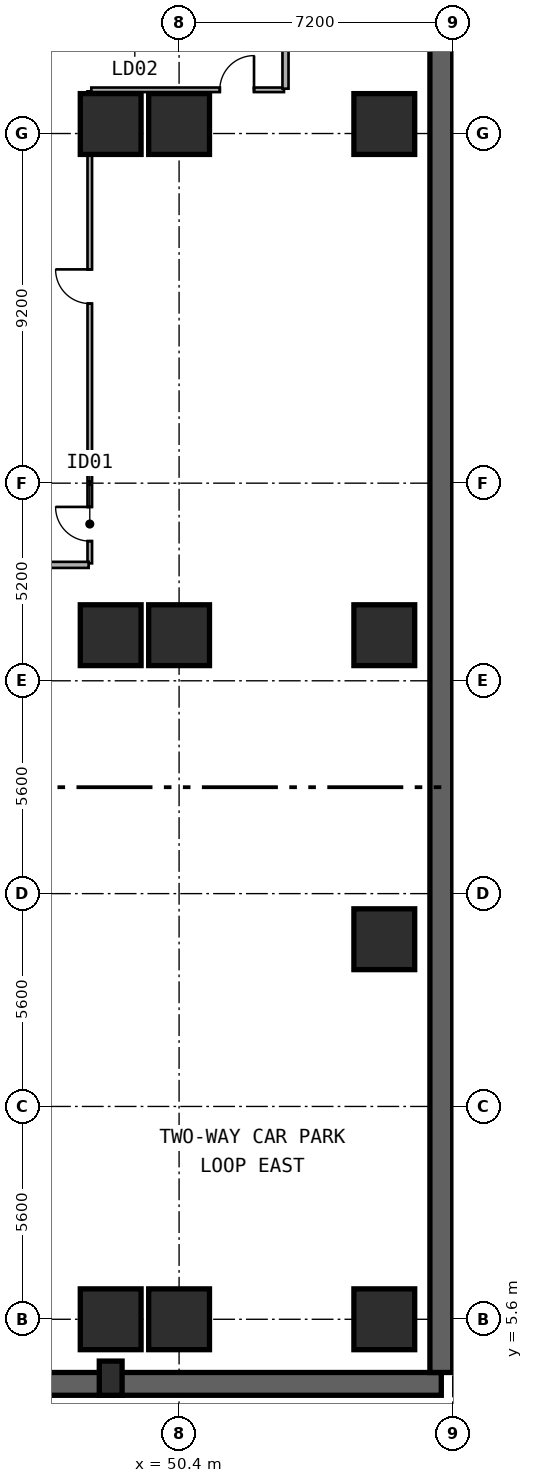
"""IFC4 building model, lengths in metres.
Left out: names, types, materials, properties, quantities, classifications, styles, units other than length and angle.
Written with IfcOpenShell. Run it as: python <this file> out.ifc"""

import sys

from ifc_helpers import new_model, si_unit, direction, frame, frame_2d, origin, origin_2d, place, context, subcontext, project, spatial, rectangle, extrude, element, fill, save


model = new_model("IFC4")
c1 = context("Model", 3, precision=1e-05, world=origin(), true_north=direction((0.0, 1.0)))
c2 = subcontext(c1, "Body", "Model", "MODEL_VIEW")
j1 = project(units=[si_unit("LENGTHUNIT", "METRE"), si_unit("PLANEANGLEUNIT", "RADIAN")], contexts=[c1])
p1 = place(None, origin())
s1 = spatial("IfcSite", under=j1, at=p1, CompositionType="ELEMENT")
p2 = place(p1, origin())
s2 = spatial("IfcBuilding", under=s1, at=p2, CompositionType="ELEMENT")
p3 = place(p2, frame((0.0, 0.0, -13.2)))
s3 = spatial("IfcBuildingStorey", under=s2, at=p3, CompositionType="ELEMENT", Elevation=-13.2)
p4 = place(p3, frame((0.3, 3.9, 0.0), z_axis=(0.0, 0.0, 1.0), x_axis=(1.0, 0.0, 0.0)))
e1 = element("IfcWall", 1, at=p4, inside=s3, PredefinedType="USERDEFINED", context=c2, shape_type="SweptSolid", body=[
    extrude(rectangle(XDim=57.0, YDim=0.6, at=frame_2d((28.5, 0.0))), origin(), (0.0, 0.0, 1.0), 4.4),
])
p5 = place(p3, frame((57.3, 4.2, 0.0), z_axis=(0.0, 0.0, 1.0), x_axis=(0.0, 1.0, 0.0)))
e2 = element("IfcWall", 2, at=p5, inside=s3, PredefinedType="USERDEFINED", context=c2, shape_type="SweptSolid", body=[
    extrude(rectangle(XDim=40.4, YDim=0.6, at=frame_2d((20.2, 0.0))), origin(), (0.0, 0.0, 1.0), 4.4),
])
for number, where, z_axis, x_axis in (
    (3, (48.6, 5.6, 0.0), (0.0, 0.0, 1.0), (1.0, 0.0, 0.0)),
    (4, (48.6, 23.6, 0.0), (0.0, 0.0, 1.0), (1.0, 0.0, 0.0)),
    (5, (48.6, 37.05, 0.0), (0.0, 0.0, 1.0), (1.0, 0.0, 0.0)),
    (6, (50.4, 5.6, 0.0), (0.0, 0.0, 1.0), (1.0, 0.0, 0.0)),
    (7, (50.4, 23.6, 0.0), (0.0, 0.0, 1.0), (1.0, 0.0, 0.0)),
    (8, (50.4, 37.05, 0.0), (0.0, 0.0, 1.0), (1.0, 0.0, 0.0)),
    (9, (55.8, 5.6, 0.0), (0.0, 0.0, 1.0), (1.0, 0.0, 0.0)),
    (10, (55.8, 15.6, 0.0), (0.0, 0.0, 1.0), (1.0, 0.0, 0.0)),
    (11, (55.8, 23.6, 0.0), (0.0, 0.0, 1.0), (1.0, 0.0, 0.0)),
    (12, (55.8, 37.05, 0.0), (0.0, 0.0, 1.0), (1.0, 0.0, 0.0)),
):
    element("IfcColumn", number, at=place(p3, frame(where, z_axis=z_axis, x_axis=x_axis)), inside=s3, PredefinedType="COLUMN", context=c2, shape_type="SweptSolid", body=[
        extrude(rectangle(XDim=1.6, YDim=1.6, at=origin_2d()), origin(), (0.0, 0.0, 1.0), 4.4),
    ])
p6 = place(p3, frame((48.6, 4.05, 0.0), z_axis=(0.0, 0.0, 1.0), x_axis=(1.0, 0.0, 0.0)))
e13 = element("IfcColumn", 13, at=p6, inside=s3, PredefinedType="PILASTER", context=c2, shape_type="SweptSolid", body=[
    extrude(rectangle(XDim=0.6, YDim=0.9, at=origin_2d()), origin(), (0.0, 0.0, 1.0), 4.4),
])
p7 = place(p3, frame((48.05, 25.49, 0.0), z_axis=(0.0, 0.0, 1.0), x_axis=(0.0, 1.0, 0.0)))
e14 = element("IfcWall", 14, at=p7, inside=s3, PredefinedType="PARTITIONING", context=c2, shape_type="SweptSolid", body=[
    extrude(rectangle(XDim=2.07, YDim=0.12, at=frame_2d((1.035, 0.0))), origin(), (0.0, 0.0, 1.0), 4.08),
])
p8 = place(p7, frame((0.585, 0.0, 0.0)))
e15 = element("IfcOpeningElement", 15, at=p8, cuts=e14, PredefinedType="OPENING", context=c2, shape_type="SweptSolid", body=[
    extrude(rectangle(XDim=0.9, YDim=2.1, at=frame_2d((0.45, 1.05))), frame((0.0, 0.07, 0.0), z_axis=(0.0, -1.0, 0.0), x_axis=(1.0, 0.0, 0.0)), (0.0, 0.0, 1.0), 0.14),
])
p9 = place(p3, frame((48.05, 27.64, 0.0), z_axis=(0.0, 0.0, 1.0), x_axis=(0.0, 1.0, 0.0)))
e16 = element("IfcWall", 16, at=p9, inside=s3, PredefinedType="PARTITIONING", context=c2, shape_type="SweptSolid", body=[
    extrude(rectangle(XDim=10.27, YDim=0.12, at=frame_2d((5.135, 0.0))), origin(), (0.0, 0.0, 1.0), 4.08),
])
p10 = place(p9, frame((4.685, 0.0, 0.0)))
e17 = element("IfcOpeningElement", 17, at=p10, cuts=e16, PredefinedType="OPENING", context=c2, shape_type="SweptSolid", body=[
    extrude(rectangle(XDim=0.9, YDim=2.1, at=frame_2d((0.45, 1.05))), frame((0.0, 0.07, 0.0), z_axis=(0.0, -1.0, 0.0), x_axis=(1.0, 0.0, 0.0)), (0.0, 0.0, 1.0), 0.14),
])
p11 = place(p3, frame((48.09, 37.95, 0.0), z_axis=(0.0, 0.0, 1.0), x_axis=(1.0, 0.0, 0.0)))
e18 = element("IfcWall", 18, at=p11, inside=s3, PredefinedType="PARTITIONING", context=c2, shape_type="SweptSolid", body=[
    extrude(rectangle(XDim=5.07, YDim=0.12, at=frame_2d((2.535, 0.0))), origin(), (0.0, 0.0, 1.0), 4.08),
])
p12 = place(p11, frame((3.382, 0.0, 0.0)))
e19 = element("IfcOpeningElement", 19, at=p12, cuts=e18, PredefinedType="OPENING", context=c2, shape_type="SweptSolid", body=[
    extrude(rectangle(XDim=0.9, YDim=2.1, at=frame_2d((0.45, 1.05))), frame((0.0, 0.07, 0.0), z_axis=(0.0, -1.0, 0.0), x_axis=(1.0, 0.0, 0.0)), (0.0, 0.0, 1.0), 0.14),
])
p13 = place(p3, frame((45.63, 25.45, 0.0), z_axis=(0.0, 0.0, 1.0), x_axis=(1.0, 0.0, 0.0)))
e20 = element("IfcWall", 20, at=p13, inside=s3, PredefinedType="PARTITIONING", context=c2, shape_type="SweptSolid", body=[
    extrude(rectangle(XDim=2.39, YDim=0.16, at=frame_2d((1.195, 0.0))), origin(), (0.0, 0.0, 1.0), 3.246),
])
p14 = place(p3, frame((53.2, 37.98, 0.0), z_axis=(0.0, 0.0, 1.0), x_axis=(0.0, 1.0, 0.0)))
e21 = element("IfcWall", 21, at=p14, inside=s3, PredefinedType="PARTITIONING", context=c2, shape_type="SweptSolid", body=[
    extrude(rectangle(XDim=1.99, YDim=0.16, at=frame_2d((0.995, 0.0))), origin(), (0.0, 0.0, 1.0), 4.08),
])
p15 = place(p8, origin())
e22 = element("IfcDoor", 22, at=p15, inside=s3, OperationType="SINGLE_SWING_RIGHT", PredefinedType="DOOR", context=c2, shape_type="SweptSolid", body=[
    extrude(rectangle(XDim=0.9, YDim=2.1, at=frame_2d((0.45, 1.05))), frame((0.0, 0.025, 0.0), z_axis=(0.0, -1.0, 0.0), x_axis=(1.0, 0.0, 0.0)), (0.0, 0.0, 1.0), 0.05),
])
fill(e15, e22)
p16 = place(p10, origin())
e23 = element("IfcDoor", 23, at=p16, inside=s3, OperationType="SINGLE_SWING_RIGHT", PredefinedType="DOOR", context=c2, shape_type="SweptSolid", body=[
    extrude(rectangle(XDim=0.9, YDim=2.1, at=frame_2d((0.45, 1.05))), frame((0.0, 0.025, 0.0), z_axis=(0.0, -1.0, 0.0), x_axis=(1.0, 0.0, 0.0)), (0.0, 0.0, 1.0), 0.05),
])
fill(e17, e23)
p17 = place(p12, origin())
e24 = element("IfcDoor", 24, at=p17, inside=s3, OperationType="SINGLE_SWING_RIGHT", PredefinedType="DOOR", context=c2, shape_type="SweptSolid", body=[
    extrude(rectangle(XDim=0.9, YDim=2.1, at=frame_2d((0.45, 1.05))), frame((0.0, 0.025, 0.0), z_axis=(0.0, -1.0, 0.0), x_axis=(1.0, 0.0, 0.0)), (0.0, 0.0, 1.0), 0.05),
])
fill(e19, e24)
save(model, sys.argv[1])
